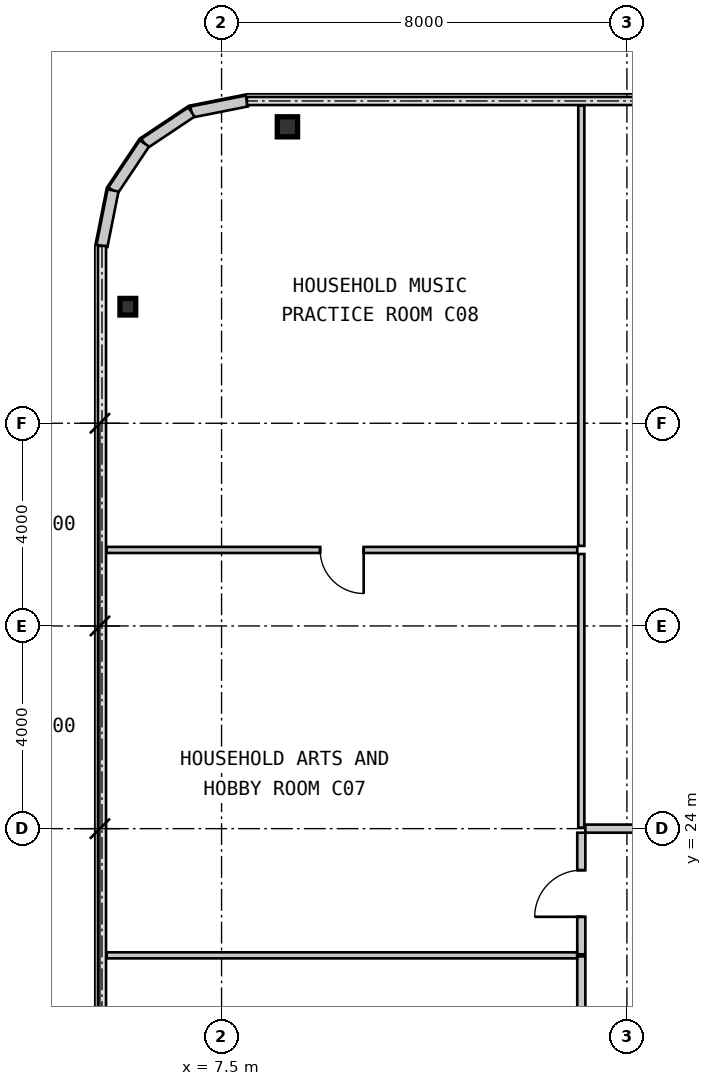
"""IFC4 building model, lengths in metres.
Left out: names, types, materials, properties, quantities, classifications, styles, units other than length and angle.
Written with IfcOpenShell. Run it as: python <this file> out.ifc"""

import sys

from ifc_helpers import new_model, si_unit, direction, frame, frame_2d, origin, origin_2d, place, context, subcontext, project, spatial, rectangle, i_section, extrude, source, transform, mapped, element, fill, save


model = new_model("IFC4")
c1 = context("Model", 3, precision=1e-05, world=origin(), true_north=direction((0.0, 1.0)))
c2 = subcontext(c1, "Body", "Model", "MODEL_VIEW")
j1 = project(units=[si_unit("LENGTHUNIT", "METRE"), si_unit("PLANEANGLEUNIT", "RADIAN")], contexts=[c1])
p1 = place(None, origin())
s1 = spatial("IfcSite", under=j1, at=p1, CompositionType="ELEMENT")
p2 = place(p1, origin())
s2 = spatial("IfcBuilding", under=s1, at=p2, CompositionType="ELEMENT")
p3 = place(p2, frame((0.0, 0.0, 26.25)))
s3 = spatial("IfcBuildingStorey", under=s2, at=p3, CompositionType="ELEMENT", Elevation=26.25)
m1 = source(origin(), c2, "Body", "SweptSolid", [
    extrude(i_section(OverallWidth=0.4, OverallDepth=0.396, WebThickness=0.022, FlangeThickness=0.034, at=origin_2d()), origin(), (0.0, 0.0, 1.0), 3.15),
])
p4 = place(p3, frame((8.8, 37.85, 0.0), z_axis=(0.0, 0.0, 1.0), x_axis=(1.0, 0.0, 0.0)))
e1 = element("IfcColumn", 1, at=p4, inside=s3, PredefinedType="COLUMN", context=c2, shape_type="MappedRepresentation", body=[
    mapped(m1, transform((0.0, 0.0, 0.0), scale=1.0)),
])
m2 = source(origin(), c2, "Body", "SweptSolid", [
    extrude(i_section(OverallWidth=0.311, OverallDepth=0.327, WebThickness=0.016, FlangeThickness=0.025, at=origin_2d()), origin(), (0.0, 0.0, 1.0), 3.15),
])
p5 = place(p3, frame((5.65, 34.3, 0.0), z_axis=(0.0, 0.0, 1.0), x_axis=(1.0, 0.0, 0.0)))
e2 = element("IfcColumn", 2, at=p5, inside=s3, PredefinedType="COLUMN", context=c2, shape_type="MappedRepresentation", body=[
    mapped(m2, transform((0.0, 0.0, 0.0), scale=1.0)),
])
m3 = source(origin(), c2, "Body", "SweptSolid", [
    extrude(rectangle(XDim=1.116, YDim=0.22, at=frame_2d((0.558, 0.0))), origin(), (0.0, 0.0, 1.0), 2.93),
])
for number, where, z_axis, x_axis in (
    (3, (8.0, 38.36, 0.0), (0.0, 0.0, 1.0), (-0.981, -0.195, 0.0)),
    (4, (6.906, 38.142, 0.0), (0.0, 0.0, 1.0), (-0.831, -0.556, 0.0)),
    (5, (5.978, 37.522, 0.0), (0.0, 0.0, 1.0), (-0.556, -0.831, 0.0)),
    (6, (5.358, 36.594, 0.0), (0.0, 0.0, 1.0), (-0.195, -0.981, 0.0)),
):
    element("IfcWall", number, at=place(p3, frame(where, z_axis=z_axis, x_axis=x_axis)), inside=s3, PredefinedType="SOLIDWALL", context=c2, shape_type="MappedRepresentation", body=[
        mapped(m3, transform((0.0, 0.0, 0.0), scale=1.0)),
    ])
m4 = source(origin(), c2, "Body", "SweptSolid", [
    extrude(rectangle(XDim=10.281, YDim=0.16, at=frame_2d((5.141, 0.0))), origin(), (0.0, 0.0, 1.0), 2.93),
])
p6 = place(p3, frame((14.6, 11.198, 0.0), z_axis=(0.0, 0.0, 1.0), x_axis=(0.0, 1.0, 0.0)))
e7 = element("IfcWall", 7, at=p6, inside=s3, PredefinedType="PARTITIONING", context=c2, shape_type="MappedRepresentation", body=[
    mapped(m4, transform((0.0, 0.0, 0.0), scale=1.0)),
])
m5 = source(origin(), c2, "Body", "SweptSolid", [
    extrude(rectangle(XDim=0.92, YDim=2.1, at=frame_2d((0.46, 1.05))), frame((0.0, 0.09, 0.0), z_axis=(0.0, -1.0, 0.0), x_axis=(1.0, 0.0, 0.0)), (0.0, 0.0, 1.0), 0.18),
])
p7 = place(p6, frame((4.681, 0.0, 0.0)))
e8 = element("IfcOpeningElement", 8, at=p7, cuts=e7, PredefinedType="OPENING", context=c2, shape_type="MappedRepresentation", body=[
    mapped(m5, transform((0.0, 0.0, 0.0), scale=1.0)),
])
m6 = source(origin(), c2, "Body", "SweptSolid", [
    extrude(rectangle(XDim=2.4, YDim=0.16, at=frame_2d((1.2, 0.0))), origin(), (0.0, 0.0, 1.0), 2.93),
])
p8 = place(p3, frame((14.6, 21.52, 0.0), z_axis=(0.0, 0.0, 1.0), x_axis=(0.0, 1.0, 0.0)))
e9 = element("IfcWall", 9, at=p8, inside=s3, PredefinedType="PARTITIONING", context=c2, shape_type="MappedRepresentation", body=[
    mapped(m6, transform((0.0, 0.0, 0.0), scale=1.0)),
])
p9 = place(p8, frame((0.74, 0.0, 0.0)))
e10 = element("IfcOpeningElement", 10, at=p9, cuts=e9, PredefinedType="OPENING", context=c2, shape_type="MappedRepresentation", body=[
    mapped(m5, transform((0.0, 0.0, 0.0), scale=1.0)),
])
m7 = source(origin(), c2, "Body", "SweptSolid", [
    extrude(rectangle(XDim=4.13, YDim=0.16, at=frame_2d((2.065, 0.0))), origin(), (0.0, 0.0, 1.0), 2.93),
])
p10 = place(p3, frame((14.68, 24.0, 0.0), z_axis=(0.0, 0.0, 1.0), x_axis=(1.0, 0.0, 0.0)))
e11 = element("IfcWall", 11, at=p10, inside=s3, PredefinedType="PARTITIONING", context=c2, shape_type="MappedRepresentation", body=[
    mapped(m7, transform((0.0, 0.0, 0.0), scale=1.0)),
])
p11 = place(p10, frame((1.69, 0.0, 0.0)))
e12 = element("IfcOpeningElement", 12, at=p11, cuts=e11, PredefinedType="OPENING", context=c2, shape_type="MappedRepresentation", body=[
    mapped(m5, transform((0.0, 0.0, 0.0), scale=1.0)),
])
m8 = source(origin(), c2, "Body", "SweptSolid", [
    extrude(rectangle(XDim=9.284, YDim=0.12, at=frame_2d((4.642, 0.0))), origin(), (0.0, 0.0, 1.0), 2.93),
])
p12 = place(p3, frame((5.233, 21.5, 0.0), z_axis=(0.0, 0.0, 1.0), x_axis=(1.0, 0.0, 0.0)))
e13 = element("IfcWall", 13, at=p12, inside=s3, PredefinedType="PARTITIONING", context=c2, shape_type="MappedRepresentation", body=[
    mapped(m8, transform((0.0, 0.0, 0.0), scale=1.0)),
])
m9 = source(origin(), c2, "Body", "SweptSolid", [
    extrude(rectangle(XDim=9.29, YDim=0.12, at=frame_2d((4.645, 0.0))), origin(), (0.0, 0.0, 1.0), 2.93),
])
p13 = place(p3, frame((5.23, 29.5, 0.0), z_axis=(0.0, 0.0, 1.0), x_axis=(1.0, 0.0, 0.0)))
e14 = element("IfcWall", 14, at=p13, inside=s3, PredefinedType="PARTITIONING", context=c2, shape_type="MappedRepresentation", body=[
    mapped(m9, transform((0.0, 0.0, 0.0), scale=1.0)),
])
m10 = source(origin(), c2, "Body", "SweptSolid", [
    extrude(rectangle(XDim=0.86, YDim=2.1, at=frame_2d((0.43, 1.05))), frame((0.0, 0.07, 0.0), z_axis=(0.0, -1.0, 0.0), x_axis=(1.0, 0.0, 0.0)), (0.0, 0.0, 1.0), 0.14),
])
p14 = place(p13, frame((4.215, 0.0, 0.0)))
e15 = element("IfcOpeningElement", 15, at=p14, cuts=e14, PredefinedType="OPENING", context=c2, shape_type="MappedRepresentation", body=[
    mapped(m10, transform((0.0, 0.0, 0.0), scale=1.0)),
])
m11 = source(origin(), c2, "Body", "SweptSolid", [
    extrude(rectangle(XDim=5.4, YDim=0.12, at=frame_2d((2.7, 0.0))), origin(), (0.0, 0.0, 1.0), 2.93),
])
p15 = place(p3, frame((14.6, 29.42, 0.0), z_axis=(0.0, 0.0, 1.0), x_axis=(0.0, -1.0, 0.0)))
e16 = element("IfcWall", 16, at=p15, inside=s3, PredefinedType="PARTITIONING", context=c2, shape_type="MappedRepresentation", body=[
    mapped(m11, transform((0.0, 0.0, 0.0), scale=1.0)),
])
m12 = source(origin(), c2, "Body", "SweptSolid", [
    extrude(rectangle(XDim=8.69, YDim=0.12, at=frame_2d((4.345, 0.0))), origin(), (0.0, 0.0, 1.0), 2.93),
])
p16 = place(p3, frame((14.6, 38.27, 0.0), z_axis=(0.0, 0.0, 1.0), x_axis=(0.0, -1.0, 0.0)))
e17 = element("IfcWall", 17, at=p16, inside=s3, PredefinedType="PARTITIONING", context=c2, shape_type="MappedRepresentation", body=[
    mapped(m12, transform((0.0, 0.0, 0.0), scale=1.0)),
])
m13 = source(origin(), c2, "Body", "SweptSolid", [
    extrude(rectangle(XDim=0.92, YDim=2.1, at=frame_2d((0.46, 1.05))), frame((0.0, 0.025, 0.0), z_axis=(0.0, -1.0, 0.0), x_axis=(1.0, 0.0, 0.0)), (0.0, 0.0, 1.0), 0.05),
])
p17 = place(p9, origin())
e18 = element("IfcDoor", 18, at=p17, inside=s3, OperationType="SINGLE_SWING_LEFT", PredefinedType="DOOR", context=c2, shape_type="MappedRepresentation", body=[
    mapped(m13, transform((0.0, 0.0, 0.0), scale=1.0)),
])
fill(e10, e18)
m14 = source(origin(), c2, "Body", "SweptSolid", [
    extrude(rectangle(XDim=0.86, YDim=2.1, at=frame_2d((0.43, 1.05))), frame((0.0, 0.025, 0.0), z_axis=(0.0, -1.0, 0.0), x_axis=(1.0, 0.0, 0.0)), (0.0, 0.0, 1.0), 0.05),
])
p18 = place(p14, frame((0.86, 0.0, 0.0), z_axis=(0.0, 0.0, 1.0), x_axis=(-1.0, 0.0, 0.0)))
e19 = element("IfcDoor", 19, at=p18, inside=s3, OperationType="SINGLE_SWING_LEFT", PredefinedType="DOOR", context=c2, shape_type="MappedRepresentation", body=[
    mapped(m14, transform((0.0, 0.0, 0.0), scale=1.0)),
])
fill(e15, e19)
save(model, sys.argv[1])
